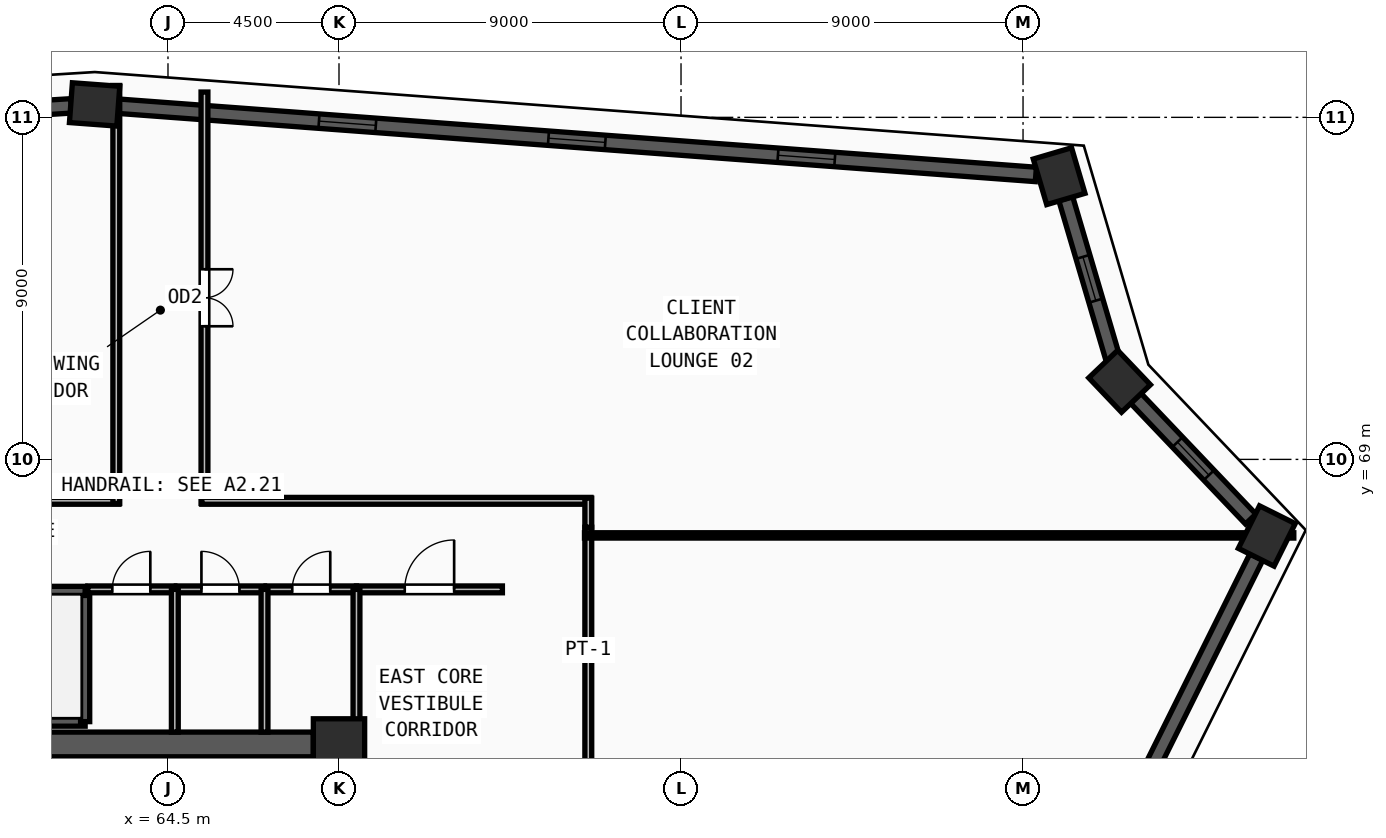
"""IFC4 building model, lengths in metres.
Left out: names, types, materials, properties, quantities, classifications, styles, units other than length and angle.
Written with IfcOpenShell. Run it as: python <this file> out.ifc"""

import sys

from ifc_helpers import new_model, si_unit, direction, frame, frame_2d, origin, origin_2d, place, context, subcontext, project, spatial, rectangle, extrude, source, transform, mapped, element, fill, save


model = new_model("IFC4")
c1 = context("Model", 3, precision=1e-05, world=origin(), true_north=direction((0.0, 1.0)))
c2 = subcontext(c1, "Body", "Model", "MODEL_VIEW")
j1 = project(units=[si_unit("LENGTHUNIT", "METRE"), si_unit("PLANEANGLEUNIT", "RADIAN")], contexts=[c1])
p1 = place(None, origin())
s1 = spatial("IfcSite", under=j1, at=p1, CompositionType="ELEMENT")
p2 = place(p1, origin())
s2 = spatial("IfcBuilding", under=s1, at=p2, CompositionType="ELEMENT")
p3 = place(p2, frame((0.0, 0.0, 213.0)))
s3 = spatial("IfcBuildingStorey", under=s2, at=p3, CompositionType="ELEMENT", Elevation=213.0)
m1 = source(origin(), c2, "Body", "SweptSolid", [
    extrude(rectangle(XDim=1.35, YDim=1.35, at=origin_2d()), origin(), (0.0, 0.0, 1.0), 3.75),
])
p4 = place(p3, frame((69.0, 61.5, 0.0), z_axis=(0.0, 0.0, 1.0), x_axis=(1.0, 0.0, 0.0)))
e1 = element("IfcColumn", 1, at=p4, inside=s3, PredefinedType="COLUMN", context=c2, shape_type="MappedRepresentation", body=[
    mapped(m1, transform((0.0, 0.0, 0.0), x_axis=(1.0, 0.0, 0.0), y_axis=(0.0, 1.0, 0.0), z_axis=(0.0, 0.0, 1.0), scale=1.0)),
])
m2 = source(origin(), c2, "Body", "SweptSolid", [
    extrude(rectangle(XDim=1.25, YDim=1.05, at=origin_2d()), origin(), (0.0, 0.0, 1.0), 3.75),
])
for number, where, z_axis, x_axis in (
    (2, (62.569, 78.34, 0.0), (0.0, 0.0, 1.0), (-0.997, 0.074, 0.0)),
    (3, (87.95, 76.452, 0.0), (0.0, 0.0, 1.0), (-0.283, 0.959, 0.0)),
    (4, (89.541, 71.055, 0.0), (0.0, 0.0, 1.0), (-0.689, 0.724, 0.0)),
    (5, (93.414, 66.985, 0.0), (0.0, 0.0, 1.0), (0.445, 0.895, 0.0)),
):
    element("IfcColumn", number, at=place(p3, frame(where, z_axis=z_axis, x_axis=x_axis)), inside=s3, PredefinedType="COLUMN", context=c2, shape_type="MappedRepresentation", body=[
        mapped(m2, transform((0.0, 0.0, 0.0), x_axis=(1.0, 0.0, 0.0), y_axis=(0.0, 1.0, 0.0), z_axis=(0.0, 0.0, 1.0), scale=1.0)),
    ])
p5 = place(p3, frame((80.069, 40.156, 0.0), z_axis=(0.0, 0.0, 1.0), x_axis=(0.445352625388, 0.895355258576, 0.0)))
e6 = element("IfcWall", 6, at=p5, inside=s3, PredefinedType="SOLIDWALL", context=c2, shape_type="SweptSolid", body=[
    extrude(rectangle(XDim=29.349, YDim=0.38, at=frame_2d((14.675, 0.0))), origin(), (0.0, 0.0, 1.0), 3.57),
])
m3 = source(origin(), c2, "Body", "SweptSolid", [
    extrude(rectangle(XDim=1.5, YDim=1.9, at=frame_2d((0.75, 0.95))), frame((0.0, 0.2, 0.0), z_axis=(0.0, -1.0, 0.0), x_axis=(1.0, 0.0, 0.0)), (0.0, 0.0, 1.0), 0.4),
])
p6 = place(p5, frame((6.587, 0.0, 0.55)))
e7 = element("IfcOpeningElement", 7, at=p6, cuts=e6, PredefinedType="OPENING", context=c2, shape_type="MappedRepresentation", body=[
    mapped(m3, transform((0.0, 0.0, 0.0), x_axis=(1.0, 0.0, 0.0), y_axis=(0.0, 1.0, 0.0), z_axis=(0.0, 0.0, 1.0), scale=1.0)),
])
p7 = place(p5, frame((14.775, 0.0, 0.55)))
e8 = element("IfcOpeningElement", 8, at=p7, cuts=e6, PredefinedType="OPENING", context=c2, shape_type="MappedRepresentation", body=[
    mapped(m3, transform((0.0, 0.0, 0.0), x_axis=(1.0, 0.0, 0.0), y_axis=(0.0, 1.0, 0.0), z_axis=(0.0, 0.0, 1.0), scale=1.0)),
])
p8 = place(p5, frame((21.262, 0.0, 0.55)))
e9 = element("IfcOpeningElement", 9, at=p8, cuts=e6, PredefinedType="OPENING", context=c2, shape_type="MappedRepresentation", body=[
    mapped(m3, transform((0.0, 0.0, 0.0), x_axis=(1.0, 0.0, 0.0), y_axis=(0.0, 1.0, 0.0), z_axis=(0.0, 0.0, 1.0), scale=1.0)),
])
p9 = place(p3, frame((92.99, 67.431, 0.0), z_axis=(0.0, 0.0, 1.0), x_axis=(-0.689446721654, 0.724336398368, 0.0)))
e10 = element("IfcWall", 10, at=p9, inside=s3, PredefinedType="SOLIDWALL", context=c2, shape_type="SweptSolid", body=[
    extrude(rectangle(XDim=4.387, YDim=0.38, at=frame_2d((2.194, 0.0))), origin(), (0.0, 0.0, 1.0), 3.57),
])
m4 = source(origin(), c2, "Body", "SweptSolid", [
    extrude(rectangle(XDim=1.2, YDim=1.9, at=frame_2d((0.6, 0.95))), frame((0.0, 0.2, 0.0), z_axis=(0.0, -1.0, 0.0), x_axis=(1.0, 0.0, 0.0)), (0.0, 0.0, 1.0), 0.4),
])
p10 = place(p9, frame((1.594, 0.0, 0.55)))
e11 = element("IfcOpeningElement", 11, at=p10, cuts=e10, PredefinedType="OPENING", context=c2, shape_type="MappedRepresentation", body=[
    mapped(m4, transform((0.0, 0.0, 0.0), x_axis=(1.0, 0.0, 0.0), y_axis=(0.0, 1.0, 0.0), z_axis=(0.0, 0.0, 1.0), scale=1.0)),
])
p11 = place(p3, frame((89.367, 71.645, 0.0), z_axis=(0.0, 0.0, 1.0), x_axis=(-0.282713462933, 0.959204408808, 0.0)))
e12 = element("IfcWall", 12, at=p11, inside=s3, PredefinedType="SOLIDWALL", context=c2, shape_type="SweptSolid", body=[
    extrude(rectangle(XDim=4.396, YDim=0.38, at=frame_2d((2.198, 0.0))), origin(), (0.0, 0.0, 1.0), 3.57),
])
p12 = place(p11, frame((1.598, 0.0, 0.55)))
e13 = element("IfcOpeningElement", 13, at=p12, cuts=e12, PredefinedType="OPENING", context=c2, shape_type="MappedRepresentation", body=[
    mapped(m4, transform((0.0, 0.0, 0.0), x_axis=(1.0, 0.0, 0.0), y_axis=(0.0, 1.0, 0.0), z_axis=(0.0, 0.0, 1.0), scale=1.0)),
])
p13 = place(p3, frame((87.337, 76.498, 0.0), z_axis=(0.0, 0.0, 1.0), x_axis=(-0.997247530885, 0.074144198316, 0.0)))
e14 = element("IfcWall", 14, at=p13, inside=s3, PredefinedType="SOLIDWALL", context=c2, shape_type="SweptSolid", body=[
    extrude(rectangle(XDim=24.222, YDim=0.38, at=frame_2d((12.111, 0.0))), origin(), (0.0, 0.0, 1.0), 3.57),
])
p14 = place(p13, frame((5.305, 0.0, 0.55)))
e15 = element("IfcOpeningElement", 15, at=p14, cuts=e14, PredefinedType="OPENING", context=c2, shape_type="MappedRepresentation", body=[
    mapped(m3, transform((0.0, 0.0, 0.0), x_axis=(1.0, 0.0, 0.0), y_axis=(0.0, 1.0, 0.0), z_axis=(0.0, 0.0, 1.0), scale=1.0)),
])
p15 = place(p13, frame((11.361, 0.0, 0.55)))
e16 = element("IfcOpeningElement", 16, at=p15, cuts=e14, PredefinedType="OPENING", context=c2, shape_type="MappedRepresentation", body=[
    mapped(m3, transform((0.0, 0.0, 0.0), x_axis=(1.0, 0.0, 0.0), y_axis=(0.0, 1.0, 0.0), z_axis=(0.0, 0.0, 1.0), scale=1.0)),
])
p16 = place(p13, frame((17.416, 0.0, 0.55)))
e17 = element("IfcOpeningElement", 17, at=p16, cuts=e14, PredefinedType="OPENING", context=c2, shape_type="MappedRepresentation", body=[
    mapped(m3, transform((0.0, 0.0, 0.0), x_axis=(1.0, 0.0, 0.0), y_axis=(0.0, 1.0, 0.0), z_axis=(0.0, 0.0, 1.0), scale=1.0)),
])
p17 = place(p3, frame((61.955, 78.302, 0.0), z_axis=(0.0, 0.0, 1.0), x_axis=(-0.998077357393, -0.061980550656, 0.0)))
e18 = element("IfcWall", 18, at=p17, inside=s3, PredefinedType="SOLIDWALL", context=c2, shape_type="SweptSolid", body=[
    extrude(rectangle(XDim=29.349, YDim=0.38, at=frame_2d((14.675, 0.0))), origin(), (0.0, 0.0, 1.0), 3.57),
])
p18 = place(p17, frame((6.587, 0.0, 0.55)))
e19 = element("IfcOpeningElement", 19, at=p18, cuts=e18, PredefinedType="OPENING", context=c2, shape_type="MappedRepresentation", body=[
    mapped(m3, transform((0.0, 0.0, 0.0), x_axis=(1.0, 0.0, 0.0), y_axis=(0.0, 1.0, 0.0), z_axis=(0.0, 0.0, 1.0), scale=1.0)),
])
p19 = place(p17, frame((13.925, 0.0, 0.55)))
e20 = element("IfcOpeningElement", 20, at=p19, cuts=e18, PredefinedType="OPENING", context=c2, shape_type="MappedRepresentation", body=[
    mapped(m3, transform((0.0, 0.0, 0.0), x_axis=(1.0, 0.0, 0.0), y_axis=(0.0, 1.0, 0.0), z_axis=(0.0, 0.0, 1.0), scale=1.0)),
])
p20 = place(p17, frame((21.262, 0.0, 0.55)))
e21 = element("IfcOpeningElement", 21, at=p20, cuts=e18, PredefinedType="OPENING", context=c2, shape_type="MappedRepresentation", body=[
    mapped(m3, transform((0.0, 0.0, 0.0), x_axis=(1.0, 0.0, 0.0), y_axis=(0.0, 1.0, 0.0), z_axis=(0.0, 0.0, 1.0), scale=1.0)),
])
p21 = place(p3, frame((60.675, 61.5, 0.0), z_axis=(0.0, 0.0, 1.0), x_axis=(1.0, 0.0, 0.0)))
e22 = element("IfcWall", 22, at=p21, inside=s3, PredefinedType="SHEAR", context=c2, shape_type="SweptSolid", body=[
    extrude(rectangle(XDim=7.65, YDim=0.65, at=frame_2d((3.825, 0.0))), origin(), (0.0, 0.0, 1.0), 3.57),
])
p22 = place(p3, frame((54.5, 62.1, 0.0), z_axis=(0.0, 0.0, 1.0), x_axis=(1.0, 0.0, 0.0)))
e23 = element("IfcWall", 23, at=p22, inside=s3, PredefinedType="SOLIDWALL", context=c2, shape_type="SweptSolid", body=[
    extrude(rectangle(XDim=7.82, YDim=0.24, at=frame_2d((3.91, 0.0))), origin(), (0.0, 0.0, 1.0), 3.57),
])
p23 = place(p3, frame((62.32, 62.1, 0.0), z_axis=(0.0, 0.0, 1.0), x_axis=(0.0, 1.0, 0.0)))
e24 = element("IfcWall", 24, at=p23, inside=s3, PredefinedType="SOLIDWALL", context=c2, shape_type="SweptSolid", body=[
    extrude(rectangle(XDim=3.44, YDim=0.24, at=frame_2d((1.72, 0.0))), origin(), (0.0, 0.0, 1.0), 3.57),
])
p24 = place(p3, frame((62.32, 65.54, 0.0), z_axis=(0.0, 0.0, 1.0), x_axis=(-1.0, 0.0, 0.0)))
e25 = element("IfcWall", 25, at=p24, inside=s3, PredefinedType="SOLIDWALL", context=c2, shape_type="SweptSolid", body=[
    extrude(rectangle(XDim=7.82, YDim=0.24, at=frame_2d((3.91, 0.0))), origin(), (0.0, 0.0, 1.0), 3.57),
])
m5 = source(origin(), c2, "Body", "SweptSolid", [
    extrude(rectangle(XDim=1.2, YDim=2.2, at=frame_2d((0.6, 1.1))), frame((0.0, 0.13, 0.0), z_axis=(0.0, -1.0, 0.0), x_axis=(1.0, 0.0, 0.0)), (0.0, 0.0, 1.0), 0.26),
])
p25 = place(p24, frame((6.3, 0.0, 0.0)))
e26 = element("IfcOpeningElement", 26, at=p25, cuts=e25, PredefinedType="OPENING", context=c2, shape_type="MappedRepresentation", body=[
    mapped(m5, transform((0.0, 0.0, 0.0), x_axis=(1.0, 0.0, 0.0), y_axis=(0.0, 1.0, 0.0), z_axis=(0.0, 0.0, 1.0), scale=1.0)),
])
p26 = place(p3, frame((62.39, 65.58, 0.0), z_axis=(0.0, 0.0, 1.0), x_axis=(1.0, 0.0, 0.0)))
e27 = element("IfcWall", 27, at=p26, inside=s3, PredefinedType="PARTITIONING", context=c2, shape_type="SweptSolid", body=[
    extrude(rectangle(XDim=2.29, YDim=0.18, at=frame_2d((1.145, 0.0))), origin(), (0.0, 0.0, 1.0), 3.57),
])
m6 = source(origin(), c2, "Body", "SweptSolid", [
    extrude(rectangle(XDim=1.0, YDim=2.2, at=frame_2d((0.5, 1.1))), frame((0.0, 0.1, 0.0), z_axis=(0.0, -1.0, 0.0), x_axis=(1.0, 0.0, 0.0)), (0.0, 0.0, 1.0), 0.2),
])
p27 = place(p26, frame((0.645, 0.0, 0.0)))
e28 = element("IfcOpeningElement", 28, at=p27, cuts=e27, PredefinedType="OPENING", context=c2, shape_type="MappedRepresentation", body=[
    mapped(m6, transform((0.0, 0.0, 0.0), x_axis=(1.0, 0.0, 0.0), y_axis=(0.0, 1.0, 0.0), z_axis=(0.0, 0.0, 1.0), scale=1.0)),
])
p28 = place(p3, frame((64.72, 65.58, 0.0), z_axis=(0.0, 0.0, 1.0), x_axis=(1.0, 0.0, 0.0)))
e29 = element("IfcWall", 29, at=p28, inside=s3, PredefinedType="PARTITIONING", context=c2, shape_type="SweptSolid", body=[
    extrude(rectangle(XDim=2.32, YDim=0.18, at=frame_2d((1.16, 0.0))), origin(), (0.0, 0.0, 1.0), 3.57),
])
p29 = place(p28, frame((0.66, 0.0, 0.0)))
e30 = element("IfcOpeningElement", 30, at=p29, cuts=e29, PredefinedType="OPENING", context=c2, shape_type="MappedRepresentation", body=[
    mapped(m6, transform((0.0, 0.0, 0.0), x_axis=(1.0, 0.0, 0.0), y_axis=(0.0, 1.0, 0.0), z_axis=(0.0, 0.0, 1.0), scale=1.0)),
])
p30 = place(p3, frame((67.08, 65.58, 0.0), z_axis=(0.0, 0.0, 1.0), x_axis=(1.0, 0.0, 0.0)))
e31 = element("IfcWall", 31, at=p30, inside=s3, PredefinedType="PARTITIONING", context=c2, shape_type="SweptSolid", body=[
    extrude(rectangle(XDim=2.38, YDim=0.18, at=frame_2d((1.19, 0.0))), origin(), (0.0, 0.0, 1.0), 3.57),
])
p31 = place(p30, frame((0.69, 0.0, 0.0)))
e32 = element("IfcOpeningElement", 32, at=p31, cuts=e31, PredefinedType="OPENING", context=c2, shape_type="MappedRepresentation", body=[
    mapped(m6, transform((0.0, 0.0, 0.0), x_axis=(1.0, 0.0, 0.0), y_axis=(0.0, 1.0, 0.0), z_axis=(0.0, 0.0, 1.0), scale=1.0)),
])
p32 = place(p3, frame((69.46, 65.58, 0.0), z_axis=(0.0, 0.0, 1.0), x_axis=(1.0, 0.0, 0.0)))
e33 = element("IfcWall", 33, at=p32, inside=s3, PredefinedType="PARTITIONING", context=c2, shape_type="SweptSolid", body=[
    extrude(rectangle(XDim=3.84, YDim=0.18, at=frame_2d((1.92, 0.0))), origin(), (0.0, 0.0, 1.0), 3.57),
])
m7 = source(origin(), c2, "Body", "SweptSolid", [
    extrude(rectangle(XDim=1.3, YDim=2.2, at=frame_2d((0.65, 1.1))), frame((0.0, 0.1, 0.0), z_axis=(0.0, -1.0, 0.0), x_axis=(1.0, 0.0, 0.0)), (0.0, 0.0, 1.0), 0.2),
])
p33 = place(p32, frame((1.27, 0.0, 0.0)))
e34 = element("IfcOpeningElement", 34, at=p33, cuts=e33, PredefinedType="OPENING", context=c2, shape_type="MappedRepresentation", body=[
    mapped(m7, transform((0.0, 0.0, 0.0), x_axis=(1.0, 0.0, 0.0), y_axis=(0.0, 1.0, 0.0), z_axis=(0.0, 0.0, 1.0), scale=1.0)),
])
p34 = place(p3, frame((75.56, 67.215, 0.0), z_axis=(0.0, 0.0, 1.0), x_axis=(0.0, -1.0, 0.0)))
e35 = element("IfcWall", 35, at=p34, inside=s3, PredefinedType="PARTITIONING", context=c2, shape_type="SweptSolid", body=[
    extrude(rectangle(XDim=14.93, YDim=0.18, at=frame_2d((7.465, 0.0))), origin(), (0.0, 0.0, 1.0), 3.57),
])
m8 = source(origin(), c2, "Body", "SweptSolid", [
    extrude(rectangle(XDim=1.5, YDim=2.2, at=frame_2d((0.75, 1.1))), frame((0.0, 0.1, 0.0), z_axis=(0.0, -1.0, 0.0), x_axis=(1.0, 0.0, 0.0)), (0.0, 0.0, 1.0), 0.2),
])
p35 = place(p34, frame((6.715, 0.0, 0.0)))
e36 = element("IfcOpeningElement", 36, at=p35, cuts=e35, PredefinedType="OPENING", context=c2, shape_type="MappedRepresentation", body=[
    mapped(m8, transform((0.0, 0.0, 0.0), x_axis=(1.0, 0.0, 0.0), y_axis=(0.0, 1.0, 0.0), z_axis=(0.0, 0.0, 1.0), scale=1.0)),
])
p36 = place(p3, frame((65.46, 78.666, 0.0), z_axis=(0.0, 0.0, 1.0), x_axis=(0.0, -1.0, 0.0)))
e37 = element("IfcWall", 37, at=p36, inside=s3, PredefinedType="PARTITIONING", context=c2, shape_type="SweptSolid", body=[
    extrude(rectangle(XDim=10.826, YDim=0.18, at=frame_2d((5.413, 0.0))), origin(), (0.0, 0.0, 1.0), 3.57),
])
p37 = place(p36, frame((4.663, 0.0, 0.0)))
e38 = element("IfcOpeningElement", 38, at=p37, cuts=e37, PredefinedType="OPENING", context=c2, shape_type="MappedRepresentation", body=[
    mapped(m8, transform((0.0, 0.0, 0.0), x_axis=(1.0, 0.0, 0.0), y_axis=(0.0, 1.0, 0.0), z_axis=(0.0, 0.0, 1.0), scale=1.0)),
])
p38 = place(p3, frame((44.37, 67.91, 0.0), z_axis=(0.0, 0.0, 1.0), x_axis=(1.0, 0.0, 0.0)))
e39 = element("IfcWall", 39, at=p38, inside=s3, PredefinedType="PARTITIONING", context=c2, shape_type="SweptSolid", body=[
    extrude(rectangle(XDim=18.84, YDim=0.18, at=frame_2d((9.42, 0.0))), origin(), (0.0, 0.0, 1.0), 3.57),
])
p39 = place(p38, frame((8.67, 0.0, 0.0)))
e40 = element("IfcOpeningElement", 40, at=p39, cuts=e39, PredefinedType="OPENING", context=c2, shape_type="MappedRepresentation", body=[
    mapped(m8, transform((0.0, 0.0, 0.0), x_axis=(1.0, 0.0, 0.0), y_axis=(0.0, 1.0, 0.0), z_axis=(0.0, 0.0, 1.0), scale=1.0)),
])
for number, where, z_axis, x_axis in (
    (41, (64.68, 61.825, 0.0), (0.0, 0.0, 1.0), (0.0, 1.0, 0.0)),
    (42, (67.04, 61.825, 0.0), (0.0, 0.0, 1.0), (0.0, 1.0, 0.0)),
):
    element("IfcWall", number, at=place(p3, frame(where, z_axis=z_axis, x_axis=x_axis)), inside=s3, PredefinedType="PARTITIONING", context=c2, shape_type="SweptSolid", body=[
        extrude(rectangle(XDim=3.755, YDim=0.18, at=frame_2d((1.877, 0.0))), origin(), (0.0, 0.0, 1.0), 3.57),
    ])
p40 = place(p3, frame((69.46, 61.95, 0.0), z_axis=(0.0, 0.0, 1.0), x_axis=(0.0, 1.0, 0.0)))
e43 = element("IfcWall", 43, at=p40, inside=s3, PredefinedType="PARTITIONING", context=c2, shape_type="SweptSolid", body=[
    extrude(rectangle(XDim=3.63, YDim=0.18, at=frame_2d((1.815, 0.0))), origin(), (0.0, 0.0, 1.0), 3.57),
])
p41 = place(p3, frame((65.39, 67.91, 0.0), z_axis=(0.0, 0.0, 1.0), x_axis=(1.0, 0.0, 0.0)))
e44 = element("IfcWall", 44, at=p41, inside=s3, PredefinedType="PARTITIONING", context=c2, shape_type="SweptSolid", body=[
    extrude(rectangle(XDim=10.24, YDim=0.18, at=frame_2d((5.12, 0.0))), origin(), (0.0, 0.0, 1.0), 3.57),
])
p42 = place(p3, frame((75.56, 67.98, 0.0), z_axis=(0.0, 0.0, 1.0), x_axis=(0.0, -1.0, 0.0)))
e45 = element("IfcWall", 45, at=p42, inside=s3, PredefinedType="PARTITIONING", context=c2, shape_type="SweptSolid", body=[
    extrude(rectangle(XDim=0.765, YDim=0.18, at=frame_2d((0.382, 0.0))), origin(), (0.0, 0.0, 1.0), 3.57),
])
p43 = place(p3, frame((63.14, 67.84, 0.0), z_axis=(0.0, 0.0, 1.0), x_axis=(0.0, 1.0, 0.0)))
e46 = element("IfcWall", 46, at=p43, inside=s3, PredefinedType="PARTITIONING", context=c2, shape_type="SweptSolid", body=[
    extrude(rectangle(XDim=10.999, YDim=0.18, at=frame_2d((5.5, 0.0))), origin(), (0.0, 0.0, 1.0), 3.57),
])
p44 = place(p3, frame((75.46, 67.0, 0.0), z_axis=(0.0, 0.0, 1.0), x_axis=(1.0, 0.0, 0.0)))
e47 = element("IfcWall", 47, at=p44, inside=s3, PredefinedType="PARTITIONING", context=c2, shape_type="SweptSolid", body=[
    extrude(rectangle(XDim=18.665, YDim=0.14, at=frame_2d((9.333, 0.0))), origin(), (0.0, 0.0, 1.0), 2.855),
])
m9 = source(origin(), c2, "Body", "SweptSolid", [
    extrude(rectangle(XDim=1.2, YDim=1.9, at=frame_2d((0.6, 0.95))), frame((0.0, 0.03, 0.0), z_axis=(0.0, -1.0, 0.0), x_axis=(1.0, 0.0, 0.0)), (0.0, 0.0, 1.0), 0.06),
])
p45 = place(p10, origin())
e48 = element("IfcWindow", 48, at=p45, inside=s3, PartitioningType="SINGLE_PANEL", PredefinedType="WINDOW", context=c2, shape_type="MappedRepresentation", body=[
    mapped(m9, transform((0.0, 0.0, 0.0), x_axis=(1.0, 0.0, 0.0), y_axis=(0.0, 1.0, 0.0), z_axis=(0.0, 0.0, 1.0), scale=1.0)),
])
fill(e11, e48)
p46 = place(p12, origin())
e49 = element("IfcWindow", 49, at=p46, inside=s3, PartitioningType="SINGLE_PANEL", PredefinedType="WINDOW", context=c2, shape_type="MappedRepresentation", body=[
    mapped(m9, transform((0.0, 0.0, 0.0), x_axis=(1.0, 0.0, 0.0), y_axis=(0.0, 1.0, 0.0), z_axis=(0.0, 0.0, 1.0), scale=1.0)),
])
fill(e13, e49)
m10 = source(origin(), c2, "Body", "SweptSolid", [
    extrude(rectangle(XDim=1.5, YDim=1.9, at=frame_2d((0.75, 0.95))), frame((0.0, 0.03, 0.0), z_axis=(0.0, -1.0, 0.0), x_axis=(1.0, 0.0, 0.0)), (0.0, 0.0, 1.0), 0.06),
])
p47 = place(p14, origin())
e50 = element("IfcWindow", 50, at=p47, inside=s3, PartitioningType="DOUBLE_PANEL_VERTICAL", PredefinedType="WINDOW", context=c2, shape_type="MappedRepresentation", body=[
    mapped(m10, transform((0.0, 0.0, 0.0), x_axis=(1.0, 0.0, 0.0), y_axis=(0.0, 1.0, 0.0), z_axis=(0.0, 0.0, 1.0), scale=1.0)),
])
fill(e15, e50)
p48 = place(p15, origin())
e51 = element("IfcWindow", 51, at=p48, inside=s3, PartitioningType="DOUBLE_PANEL_VERTICAL", PredefinedType="WINDOW", context=c2, shape_type="MappedRepresentation", body=[
    mapped(m10, transform((0.0, 0.0, 0.0), x_axis=(1.0, 0.0, 0.0), y_axis=(0.0, 1.0, 0.0), z_axis=(0.0, 0.0, 1.0), scale=1.0)),
])
fill(e16, e51)
p49 = place(p16, origin())
e52 = element("IfcWindow", 52, at=p49, inside=s3, PartitioningType="DOUBLE_PANEL_VERTICAL", PredefinedType="WINDOW", context=c2, shape_type="MappedRepresentation", body=[
    mapped(m10, transform((0.0, 0.0, 0.0), x_axis=(1.0, 0.0, 0.0), y_axis=(0.0, 1.0, 0.0), z_axis=(0.0, 0.0, 1.0), scale=1.0)),
])
fill(e17, e52)
m11 = source(origin(), c2, "Body", "SweptSolid", [
    extrude(rectangle(XDim=1.0, YDim=2.2, at=frame_2d((0.5, 1.1))), frame((0.0, 0.025, 0.0), z_axis=(0.0, -1.0, 0.0), x_axis=(1.0, 0.0, 0.0)), (0.0, 0.0, 1.0), 0.05),
])
p50 = place(p27, origin())
e53 = element("IfcDoor", 53, at=p50, inside=s3, OperationType="SINGLE_SWING_RIGHT", PredefinedType="DOOR", context=c2, shape_type="MappedRepresentation", body=[
    mapped(m11, transform((0.0, 0.0, 0.0), x_axis=(1.0, 0.0, 0.0), y_axis=(0.0, 1.0, 0.0), z_axis=(0.0, 0.0, 1.0), scale=1.0)),
])
fill(e28, e53)
p51 = place(p29, origin())
e54 = element("IfcDoor", 54, at=p51, inside=s3, OperationType="SINGLE_SWING_LEFT", PredefinedType="DOOR", context=c2, shape_type="MappedRepresentation", body=[
    mapped(m11, transform((0.0, 0.0, 0.0), x_axis=(1.0, 0.0, 0.0), y_axis=(0.0, 1.0, 0.0), z_axis=(0.0, 0.0, 1.0), scale=1.0)),
])
fill(e30, e54)
p52 = place(p31, origin())
e55 = element("IfcDoor", 55, at=p52, inside=s3, OperationType="SINGLE_SWING_RIGHT", PredefinedType="DOOR", context=c2, shape_type="MappedRepresentation", body=[
    mapped(m11, transform((0.0, 0.0, 0.0), x_axis=(1.0, 0.0, 0.0), y_axis=(0.0, 1.0, 0.0), z_axis=(0.0, 0.0, 1.0), scale=1.0)),
])
fill(e32, e55)
m12 = source(origin(), c2, "Body", "SweptSolid", [
    extrude(rectangle(XDim=1.3, YDim=2.2, at=frame_2d((0.65, 1.1))), frame((0.0, 0.025, 0.0), z_axis=(0.0, -1.0, 0.0), x_axis=(1.0, 0.0, 0.0)), (0.0, 0.0, 1.0), 0.05),
])
p53 = place(p33, origin())
e56 = element("IfcDoor", 56, at=p53, inside=s3, OperationType="SINGLE_SWING_RIGHT", PredefinedType="DOOR", context=c2, shape_type="MappedRepresentation", body=[
    mapped(m12, transform((0.0, 0.0, 0.0), x_axis=(1.0, 0.0, 0.0), y_axis=(0.0, 1.0, 0.0), z_axis=(0.0, 0.0, 1.0), scale=1.0)),
])
fill(e34, e56)
m13 = source(origin(), c2, "Body", "SweptSolid", [
    extrude(rectangle(XDim=1.5, YDim=2.2, at=frame_2d((0.75, 1.1))), frame((0.0, 0.025, 0.0), z_axis=(0.0, -1.0, 0.0), x_axis=(1.0, 0.0, 0.0)), (0.0, 0.0, 1.0), 0.05),
])
p54 = place(p37, origin())
e57 = element("IfcDoor", 57, at=p54, inside=s3, OperationType="DOUBLE_DOOR_SINGLE_SWING", PredefinedType="DOOR", context=c2, shape_type="MappedRepresentation", body=[
    mapped(m13, transform((0.0, 0.0, 0.0), x_axis=(1.0, 0.0, 0.0), y_axis=(0.0, 1.0, 0.0), z_axis=(0.0, 0.0, 1.0), scale=1.0)),
])
fill(e38, e57)
save(model, sys.argv[1])
